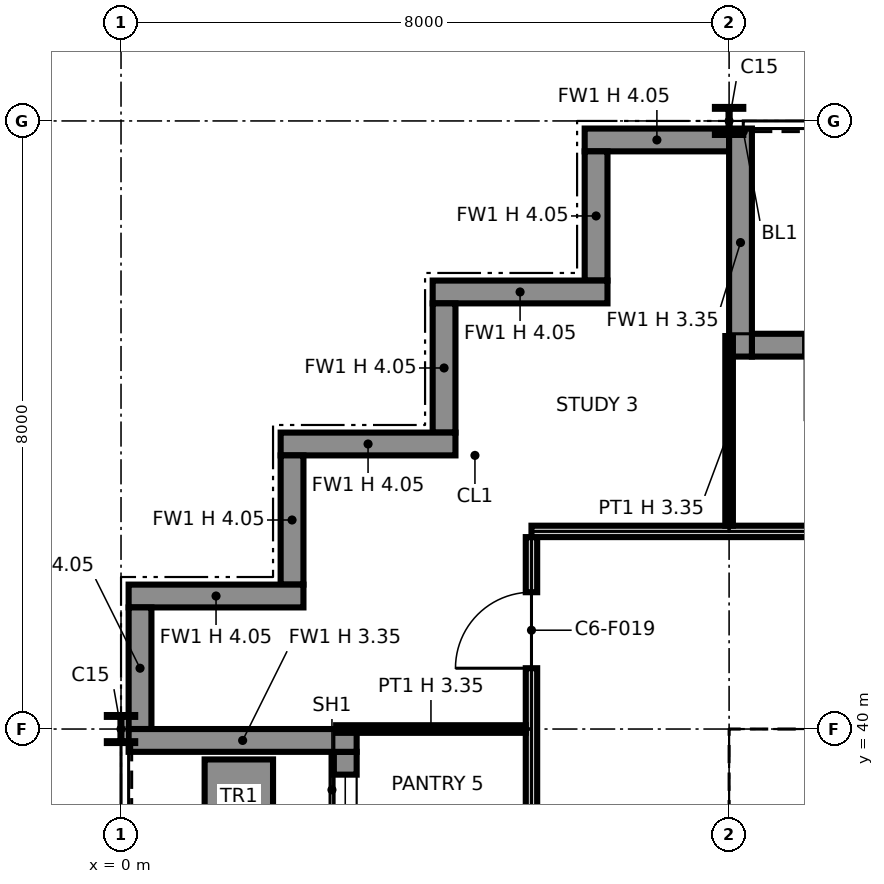
"""IFC4 building model, lengths in metres.
Left out: names, types, materials, properties, quantities, classifications, styles, units other than length and angle.
Written with IfcOpenShell. Run it as: python <this file> out.ifc"""

import sys

from ifc_helpers import new_model, si_unit, direction, frame, frame_2d, origin, origin_2d, place, context, subcontext, project, spatial, polyline, rectangle, i_section, outline, extrude, element, fill, save


model = new_model("IFC4")
c1 = context("Model", 3, precision=1e-05, world=origin(), true_north=direction((0.0, 1.0)))
c2 = subcontext(c1, "Body", "Model", "MODEL_VIEW")
j1 = project(units=[si_unit("LENGTHUNIT", "METRE"), si_unit("PLANEANGLEUNIT", "RADIAN")], contexts=[c1])
p1 = place(None, origin())
s1 = spatial("IfcSite", under=j1, at=p1, CompositionType="ELEMENT")
p2 = place(p1, origin())
s2 = spatial("IfcBuilding", under=s1, at=p2, CompositionType="ELEMENT")
p3 = place(p2, frame((0.0, 0.0, 174.6)))
s3 = spatial("IfcBuildingStorey", under=s2, at=p3, CompositionType="ELEMENT", Elevation=174.6)
p4 = place(p3, frame((0.0, 40.0, 0.0), z_axis=(0.0, 0.0, 1.0), x_axis=(1.0, 0.0, 0.0)))
e1 = element("IfcColumn", 1, at=p4, inside=s3, PredefinedType="COLUMN", context=c2, shape_type="SweptSolid", body=[
    extrude(i_section(OverallWidth=0.373, OverallDepth=0.368, WebThickness=0.015, FlangeThickness=0.024, at=origin_2d()), origin(), (0.0, 0.0, 1.0), 4.05),
])
p5 = place(p3, frame((8.0, 40.0, 0.0), z_axis=(0.0, 0.0, 1.0), x_axis=(1.0, 0.0, 0.0)))
e2 = element("IfcColumn", 2, at=p5, inside=s3, PredefinedType="COLUMN", context=c2, shape_type="SweptSolid", body=[
    extrude(i_section(OverallWidth=0.257, OverallDepth=0.363, WebThickness=0.013, FlangeThickness=0.022, at=origin_2d()), origin(), (0.0, 0.0, 1.0), 4.05),
])
p6 = place(p3, frame((8.0, 48.0, 0.0), z_axis=(0.0, 0.0, 1.0), x_axis=(1.0, 0.0, 0.0)))
e3 = element("IfcColumn", 3, at=p6, inside=s3, PredefinedType="COLUMN", context=c2, shape_type="SweptSolid", body=[
    extrude(i_section(OverallWidth=0.373, OverallDepth=0.368, WebThickness=0.015, FlangeThickness=0.024, at=origin_2d()), origin(), (0.0, 0.0, 1.0), 4.05),
])
p7 = place(p3, frame((15.7, 45.05, 0.0), z_axis=(0.0, 0.0, 1.0), x_axis=(-1.0, 0.0, 0.0)))
e4 = element("IfcWall", 4, at=p7, inside=s3, PredefinedType="SOLIDWALL", context=c2, shape_type="SweptSolid", body=[
    extrude(rectangle(XDim=7.4, YDim=0.3, at=frame_2d((3.7, 0.0))), origin(), (0.0, 0.0, 1.0), 4.05),
])
p8 = place(p7, frame((0.3, 0.0, 0.9)))
e5 = element("IfcOpeningElement", 5, at=p8, cuts=e4, PredefinedType="OPENING", context=c2, shape_type="SweptSolid", body=[
    extrude(rectangle(XDim=2.8, YDim=2.2, at=frame_2d((1.4, 1.1))), frame((0.0, 0.16, 0.0), z_axis=(0.0, -1.0, 0.0), x_axis=(1.0, 0.0, 0.0)), (0.0, 0.0, 1.0), 0.32),
])
p9 = place(p7, frame((4.7, 0.0, 0.0)))
e6 = element("IfcOpeningElement", 6, at=p9, cuts=e4, PredefinedType="OPENING", context=c2, shape_type="SweptSolid", body=[
    extrude(rectangle(XDim=2.0, YDim=2.4, at=frame_2d((1.0, 1.2))), frame((0.0, 0.16, 0.0), z_axis=(0.0, -1.0, 0.0), x_axis=(1.0, 0.0, 0.0)), (0.0, 0.0, 1.0), 0.32),
])
p10 = place(p3, frame((8.15, 47.9, 0.0), z_axis=(0.0, 0.0, 1.0), x_axis=(0.0, -1.0, 0.0)))
e7 = element("IfcWall", 7, at=p10, inside=s3, PredefinedType="SOLIDWALL", context=c2, shape_type="SweptSolid", body=[
    extrude(rectangle(XDim=3.0, YDim=0.3, at=frame_2d((1.5, 0.0))), origin(), (0.0, 0.0, 1.0), 3.353),
])
p11 = place(p3, frame((8.0, 47.75, 0.0), z_axis=(0.0, 0.0, 1.0), x_axis=(-1.0, 0.0, 0.0)))
e8 = element("IfcWall", 8, at=p11, inside=s3, PredefinedType="SOLIDWALL", context=c2, shape_type="SweptSolid", body=[
    extrude(rectangle(XDim=1.9, YDim=0.3, at=frame_2d((0.95, 0.0))), origin(), (0.0, 0.0, 1.0), 4.05),
])
p12 = place(p3, frame((6.25, 47.6, 0.0), z_axis=(0.0, 0.0, 1.0), x_axis=(0.0, -1.0, 0.0)))
e9 = element("IfcWall", 9, at=p12, inside=s3, PredefinedType="SOLIDWALL", context=c2, shape_type="SweptSolid", body=[
    extrude(rectangle(XDim=1.7, YDim=0.3, at=frame_2d((0.85, 0.0))), origin(), (0.0, 0.0, 1.0), 4.05),
])
p13 = place(p3, frame((6.4, 45.75, 0.0), z_axis=(0.0, 0.0, 1.0), x_axis=(-1.0, 0.0, 0.0)))
e10 = element("IfcWall", 10, at=p13, inside=s3, PredefinedType="SOLIDWALL", context=c2, shape_type="SweptSolid", body=[
    extrude(rectangle(XDim=2.3, YDim=0.3, at=frame_2d((1.15, 0.0))), origin(), (0.0, 0.0, 1.0), 4.05),
])
p14 = place(p3, frame((4.25, 45.6, 0.0), z_axis=(0.0, 0.0, 1.0), x_axis=(0.0, -1.0, 0.0)))
e11 = element("IfcWall", 11, at=p14, inside=s3, PredefinedType="SOLIDWALL", context=c2, shape_type="SweptSolid", body=[
    extrude(rectangle(XDim=1.7, YDim=0.3, at=frame_2d((0.85, 0.0))), origin(), (0.0, 0.0, 1.0), 4.05),
])
p15 = place(p3, frame((4.4, 43.75, 0.0), z_axis=(0.0, 0.0, 1.0), x_axis=(-1.0, 0.0, 0.0)))
e12 = element("IfcWall", 12, at=p15, inside=s3, PredefinedType="SOLIDWALL", context=c2, shape_type="SweptSolid", body=[
    extrude(rectangle(XDim=2.3, YDim=0.3, at=frame_2d((1.15, 0.0))), origin(), (0.0, 0.0, 1.0), 4.05),
])
p16 = place(p3, frame((2.25, 43.6, 0.0), z_axis=(0.0, 0.0, 1.0), x_axis=(0.0, -1.0, 0.0)))
e13 = element("IfcWall", 13, at=p16, inside=s3, PredefinedType="SOLIDWALL", context=c2, shape_type="SweptSolid", body=[
    extrude(rectangle(XDim=1.7, YDim=0.3, at=frame_2d((0.85, 0.0))), origin(), (0.0, 0.0, 1.0), 4.05),
])
p17 = place(p3, frame((2.4, 41.75, 0.0), z_axis=(0.0, 0.0, 1.0), x_axis=(-1.0, 0.0, 0.0)))
e14 = element("IfcWall", 14, at=p17, inside=s3, PredefinedType="SOLIDWALL", context=c2, shape_type="SweptSolid", body=[
    extrude(rectangle(XDim=2.3, YDim=0.3, at=frame_2d((1.15, 0.0))), origin(), (0.0, 0.0, 1.0), 4.05),
])
p18 = place(p3, frame((0.25, 41.6, 0.0), z_axis=(0.0, 0.0, 1.0), x_axis=(0.0, -1.0, 0.0)))
e15 = element("IfcWall", 15, at=p18, inside=s3, PredefinedType="SOLIDWALL", context=c2, shape_type="SweptSolid", body=[
    extrude(rectangle(XDim=1.6, YDim=0.3, at=frame_2d((0.8, 0.0))), origin(), (0.0, 0.0, 1.0), 4.05),
])
p19 = place(p3, frame((2.95, 39.7, 0.0), z_axis=(0.0, 0.0, 1.0), x_axis=(0.0, -1.0, 0.0)))
e16 = element("IfcWall", 16, at=p19, inside=s3, PredefinedType="SOLIDWALL", context=c2, shape_type="SweptSolid", body=[
    extrude(rectangle(XDim=7.4, YDim=0.3, at=frame_2d((3.7, 0.0))), origin(), (0.0, 0.0, 1.0), 4.05),
])
p20 = place(p19, frame((0.3, 0.0, 0.9)))
e17 = element("IfcOpeningElement", 17, at=p20, cuts=e16, PredefinedType="OPENING", context=c2, shape_type="SweptSolid", body=[
    extrude(rectangle(XDim=2.8, YDim=2.2, at=frame_2d((1.4, 1.1))), frame((0.0, 0.16, 0.0), z_axis=(0.0, -1.0, 0.0), x_axis=(1.0, 0.0, 0.0)), (0.0, 0.0, 1.0), 0.32),
])
p21 = place(p19, frame((4.7, 0.0, 0.0)))
e18 = element("IfcOpeningElement", 18, at=p21, cuts=e16, PredefinedType="OPENING", context=c2, shape_type="SweptSolid", body=[
    extrude(rectangle(XDim=2.0, YDim=2.4, at=frame_2d((1.0, 1.2))), frame((0.0, 0.16, 0.0), z_axis=(0.0, -1.0, 0.0), x_axis=(1.0, 0.0, 0.0)), (0.0, 0.0, 1.0), 0.32),
])
p22 = place(p3, frame((0.1, 39.85, 0.0), z_axis=(0.0, 0.0, 1.0), x_axis=(1.0, 0.0, 0.0)))
e19 = element("IfcWall", 19, at=p22, inside=s3, PredefinedType="SOLIDWALL", context=c2, shape_type="SweptSolid", body=[
    extrude(rectangle(XDim=3.0, YDim=0.3, at=frame_2d((1.5, 0.0))), origin(), (0.0, 0.0, 1.0), 3.353),
])
p23 = place(p3, frame((1.55, 39.6, 0.0), z_axis=(0.0, 0.0, 1.0), x_axis=(0.0, -1.0, 0.0)))
e20 = element("IfcWall", 20, at=p23, inside=s3, PredefinedType="SOLIDWALL", context=c2, shape_type="SweptSolid", body=[
    extrude(rectangle(XDim=3.2, YDim=0.9, at=frame_2d((1.6, 0.0))), origin(), (0.0, 0.0, 1.0), 0.6),
])
p24 = place(p3, frame((8.75, 32.85, 0.0), z_axis=(0.0, 0.0, 1.0), x_axis=(0.0, 1.0, 0.0)))
e21 = element("IfcWall", 21, at=p24, inside=s3, PredefinedType="PARTITIONING", context=c2, shape_type="SweptSolid", body=[
    extrude(outline(polyline([(0.0, 0.0), (6.3, 0.0), (6.3, 4.05), (3.231, 4.05), (3.23, 3.589), (3.07, 3.589), (3.069, 4.05), (0.0, 4.05), (0.0, 0.0)])), frame((0.0, 0.1, 0.0), z_axis=(0.0, -1.0, 0.0), x_axis=(1.0, 0.0, 0.0)), (0.0, 0.0, 1.0), 0.2),
])
p25 = place(p3, frame((8.65, 39.25, 0.0), z_axis=(0.0, 0.0, 1.0), x_axis=(1.0, 0.0, 0.0)))
e22 = element("IfcWall", 22, at=p25, inside=s3, PredefinedType="PARTITIONING", context=c2, shape_type="SweptSolid", body=[
    extrude(outline(polyline([(0.0, 0.0), (14.7, 0.0), (14.7, 4.05), (7.469, 4.05), (7.468, 3.442), (7.232, 3.442), (7.231, 4.05), (0.0, 4.05), (0.0, 0.0)])), frame((0.0, 0.1, 0.0), z_axis=(0.0, -1.0, 0.0), x_axis=(1.0, 0.0, 0.0)), (0.0, 0.0, 1.0), 0.2),
])
p26 = place(p3, frame((5.4, 5.4, 0.0), z_axis=(0.0, 0.0, 1.0), x_axis=(0.0, 1.0, 0.0)))
e23 = element("IfcWall", 23, at=p26, inside=s3, PredefinedType="PARTITIONING", context=c2, shape_type="SweptSolid", body=[
    extrude(outline(polyline([(0.0, 0.0), (37.125, 0.0), (37.125, 4.05), (34.9, 4.05), (34.898, 3.354), (34.302, 3.354), (34.3, 4.05), (30.9, 4.05), (30.898, 3.354), (30.302, 3.354), (30.3, 4.05), (26.9, 4.05), (26.898, 3.354), (26.302, 3.354), (26.3, 4.05), (22.9, 4.05), (22.898, 3.354), (22.302, 3.354), (22.3, 4.05), (18.9, 4.05), (18.898, 3.354), (18.302, 3.354), (18.3, 4.05), (14.9, 4.05), (14.898, 3.354), (14.302, 3.354), (14.3, 4.05), (10.9, 4.05), (10.898, 3.354), (10.302, 3.354), (10.3, 4.05), (6.9, 4.05), (6.898, 3.354), (6.302, 3.354), (6.3, 4.05), (2.9, 4.05), (2.898, 3.354), (2.302, 3.354), (2.3, 4.05), (0.0, 4.05), (0.0, 0.0)])), frame((0.0, 0.075, 0.0), z_axis=(0.0, -1.0, 0.0), x_axis=(1.0, 0.0, 0.0)), (0.0, 0.0, 1.0), 0.15),
])
p27 = place(p26, frame((0.8, 0.0, 0.0)))
e24 = element("IfcOpeningElement", 24, at=p27, cuts=e23, PredefinedType="OPENING", context=c2, shape_type="SweptSolid", body=[
    extrude(rectangle(XDim=1.0, YDim=2.1, at=frame_2d((0.5, 1.05))), frame((0.0, 0.085, 0.0), z_axis=(0.0, -1.0, 0.0), x_axis=(1.0, 0.0, 0.0)), (0.0, 0.0, 1.0), 0.17),
])
p28 = place(p26, frame((6.1, 0.0, 0.0)))
e25 = element("IfcOpeningElement", 25, at=p28, cuts=e23, PredefinedType="OPENING", context=c2, shape_type="SweptSolid", body=[
    extrude(rectangle(XDim=1.0, YDim=2.1, at=frame_2d((0.5, 1.05))), frame((0.0, 0.085, 0.0), z_axis=(0.0, -1.0, 0.0), x_axis=(1.0, 0.0, 0.0)), (0.0, 0.0, 1.0), 0.17),
])
p29 = place(p26, frame((11.825, 0.0, 0.0)))
e26 = element("IfcOpeningElement", 26, at=p29, cuts=e23, PredefinedType="OPENING", context=c2, shape_type="SweptSolid", body=[
    extrude(rectangle(XDim=1.0, YDim=2.1, at=frame_2d((0.5, 1.05))), frame((0.0, 0.085, 0.0), z_axis=(0.0, -1.0, 0.0), x_axis=(1.0, 0.0, 0.0)), (0.0, 0.0, 1.0), 0.17),
])
p30 = place(p26, frame((16.1, 0.0, 0.0)))
e27 = element("IfcOpeningElement", 27, at=p30, cuts=e23, PredefinedType="OPENING", context=c2, shape_type="SweptSolid", body=[
    extrude(rectangle(XDim=1.0, YDim=2.1, at=frame_2d((0.5, 1.05))), frame((0.0, 0.085, 0.0), z_axis=(0.0, -1.0, 0.0), x_axis=(1.0, 0.0, 0.0)), (0.0, 0.0, 1.0), 0.17),
])
p31 = place(p26, frame((20.8, 0.0, 0.0)))
e28 = element("IfcOpeningElement", 28, at=p31, cuts=e23, PredefinedType="OPENING", context=c2, shape_type="SweptSolid", body=[
    extrude(rectangle(XDim=1.0, YDim=2.1, at=frame_2d((0.5, 1.05))), frame((0.0, 0.085, 0.0), z_axis=(0.0, -1.0, 0.0), x_axis=(1.0, 0.0, 0.0)), (0.0, 0.0, 1.0), 0.17),
])
p32 = place(p26, frame((28.1, 0.0, 0.0)))
e29 = element("IfcOpeningElement", 29, at=p32, cuts=e23, PredefinedType="OPENING", context=c2, shape_type="SweptSolid", body=[
    extrude(rectangle(XDim=1.0, YDim=2.1, at=frame_2d((0.5, 1.05))), frame((0.0, 0.085, 0.0), z_axis=(0.0, -1.0, 0.0), x_axis=(1.0, 0.0, 0.0)), (0.0, 0.0, 1.0), 0.17),
])
p33 = place(p26, frame((32.1, 0.0, 0.0)))
e30 = element("IfcOpeningElement", 30, at=p33, cuts=e23, PredefinedType="OPENING", context=c2, shape_type="SweptSolid", body=[
    extrude(rectangle(XDim=1.0, YDim=2.1, at=frame_2d((0.5, 1.05))), frame((0.0, 0.085, 0.0), z_axis=(0.0, -1.0, 0.0), x_axis=(1.0, 0.0, 0.0)), (0.0, 0.0, 1.0), 0.17),
])
p34 = place(p26, frame((35.4, 0.0, 0.0)))
e31 = element("IfcOpeningElement", 31, at=p34, cuts=e23, PredefinedType="OPENING", context=c2, shape_type="SweptSolid", body=[
    extrude(rectangle(XDim=1.0, YDim=2.1, at=frame_2d((0.5, 1.05))), frame((0.0, 0.085, 0.0), z_axis=(0.0, -1.0, 0.0), x_axis=(1.0, 0.0, 0.0)), (0.0, 0.0, 1.0), 0.17),
])
p35 = place(p3, frame((2.83, 40.0, 0.0), z_axis=(0.0, 0.0, 1.0), x_axis=(1.0, 0.0, 0.0)))
e32 = element("IfcWall", 32, at=p35, inside=s3, PredefinedType="PARTITIONING", context=c2, shape_type="SweptSolid", body=[
    extrude(rectangle(XDim=2.495, YDim=0.1, at=frame_2d((1.248, 0.0))), origin(), (0.0, 0.0, 1.0), 3.354),
])
p36 = place(p3, frame((5.4, 42.6, 0.0), z_axis=(0.0, 0.0, 1.0), x_axis=(1.0, 0.0, 0.0)))
e33 = element("IfcWall", 33, at=p36, inside=s3, PredefinedType="PARTITIONING", context=c2, shape_type="SweptSolid", body=[
    extrude(rectangle(XDim=16.17, YDim=0.15, at=frame_2d((8.085, 0.0))), origin(), (0.0, 0.0, 1.0), 4.05),
])
p37 = place(p36, frame((4.1, 0.0, 0.0)))
e34 = element("IfcOpeningElement", 34, at=p37, cuts=e33, PredefinedType="OPENING", context=c2, shape_type="SweptSolid", body=[
    extrude(rectangle(XDim=1.0, YDim=2.1, at=frame_2d((0.5, 1.05))), frame((0.0, 0.085, 0.0), z_axis=(0.0, -1.0, 0.0), x_axis=(1.0, 0.0, 0.0)), (0.0, 0.0, 1.0), 0.17),
])
p38 = place(p36, frame((8.1, 0.0, 0.0)))
e35 = element("IfcOpeningElement", 35, at=p38, cuts=e33, PredefinedType="OPENING", context=c2, shape_type="SweptSolid", body=[
    extrude(rectangle(XDim=1.0, YDim=2.1, at=frame_2d((0.5, 1.05))), frame((0.0, 0.085, 0.0), z_axis=(0.0, -1.0, 0.0), x_axis=(1.0, 0.0, 0.0)), (0.0, 0.0, 1.0), 0.17),
])
p39 = place(p36, frame((13.05, 0.0, 0.0)))
e36 = element("IfcOpeningElement", 36, at=p39, cuts=e33, PredefinedType="OPENING", context=c2, shape_type="SweptSolid", body=[
    extrude(rectangle(XDim=1.0, YDim=2.1, at=frame_2d((0.5, 1.05))), frame((0.0, 0.085, 0.0), z_axis=(0.0, -1.0, 0.0), x_axis=(1.0, 0.0, 0.0)), (0.0, 0.0, 1.0), 0.17),
])
p40 = place(p3, frame((8.0, 42.675, 0.0), z_axis=(0.0, 0.0, 1.0), x_axis=(0.0, 1.0, 0.0)))
e37 = element("IfcWall", 37, at=p40, inside=s3, PredefinedType="PARTITIONING", context=c2, shape_type="SweptSolid", body=[
    extrude(rectangle(XDim=2.495, YDim=0.1, at=frame_2d((1.248, 0.0))), origin(), (0.0, 0.0, 1.0), 3.354),
])
p41 = place(p20, origin())
e38 = element("IfcWindow", 38, at=p41, inside=s3, PartitioningType="SINGLE_PANEL", PredefinedType="WINDOW", context=c2, shape_type="SweptSolid", body=[
    extrude(rectangle(XDim=2.8, YDim=2.2, at=frame_2d((1.4, 1.1))), frame((0.0, 0.03, 0.0), z_axis=(0.0, -1.0, 0.0), x_axis=(1.0, 0.0, 0.0)), (0.0, 0.0, 1.0), 0.06),
])
fill(e17, e38)
p42 = place(p34, origin())
e39 = element("IfcDoor", 39, at=p42, inside=s3, OperationType="SINGLE_SWING_LEFT", PredefinedType="DOOR", context=c2, shape_type="SweptSolid", body=[
    extrude(rectangle(XDim=1.0, YDim=2.1, at=frame_2d((0.5, 1.05))), frame((0.0, 0.025, 0.0), z_axis=(0.0, -1.0, 0.0), x_axis=(1.0, 0.0, 0.0)), (0.0, 0.0, 1.0), 0.05),
])
fill(e31, e39)
save(model, sys.argv[1])
